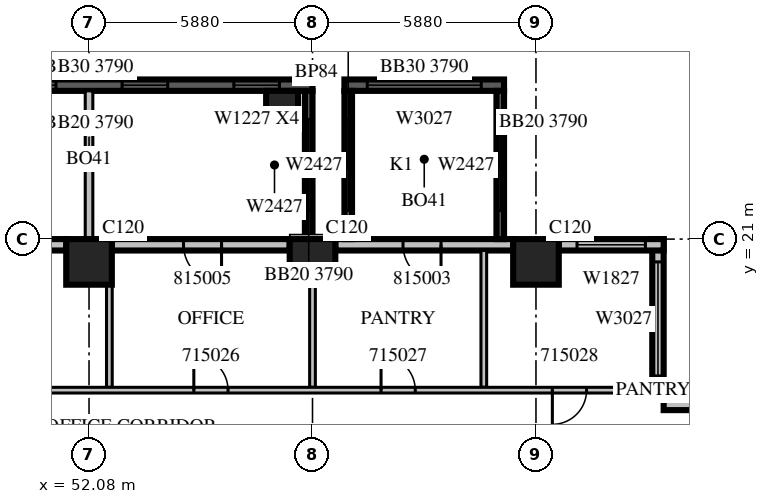
"""IFC4 building model, lengths in metres.
Left out: names, types, materials, properties, quantities, classifications, styles, units other than length and angle.
Written with IfcOpenShell. Run it as: python <this file> out.ifc"""

import sys

from ifc_helpers import new_model, si_unit, direction, frame, frame_2d, origin, origin_2d, place, context, subcontext, project, spatial, rectangle, extrude, source, transform, mapped, element, fill, save


model = new_model("IFC4")
c1 = context("Model", 3, precision=1e-05, world=origin(), true_north=direction((0.0, 1.0)))
c2 = subcontext(c1, "Body", "Model", "MODEL_VIEW")
j1 = project(units=[si_unit("LENGTHUNIT", "METRE"), si_unit("PLANEANGLEUNIT", "RADIAN")], contexts=[c1])
p1 = place(None, origin())
s1 = spatial("IfcSite", under=j1, at=p1, CompositionType="ELEMENT")
p2 = place(p1, origin())
s2 = spatial("IfcBuilding", under=s1, at=p2, CompositionType="ELEMENT")
p3 = place(p2, frame((0.0, 0.0, 74.1)))
s3 = spatial("IfcBuildingStorey", under=s2, at=p3, CompositionType="ELEMENT", Elevation=74.1)
m1 = source(origin(), c2, "Body", "SweptSolid", [
    extrude(rectangle(XDim=1.2, YDim=1.2, at=origin_2d()), origin(), (0.0, 0.0, 1.0), 4.2),
])
for number, where, z_axis, x_axis in (
    (1, (52.08, 20.4, 0.0), (0.0, 0.0, 1.0), (1.0, 0.0, 0.0)),
    (2, (57.96, 20.4, 0.0), (0.0, 0.0, 1.0), (1.0, 0.0, 0.0)),
    (3, (63.84, 20.4, 0.0), (0.0, 0.0, 1.0), (1.0, 0.0, 0.0)),
):
    element("IfcColumn", number, at=place(p3, frame(where, z_axis=z_axis, x_axis=x_axis)), inside=s3, PredefinedType="COLUMN", context=c2, shape_type="MappedRepresentation", body=[
        mapped(m1, transform((0.0, 0.0, 0.0), scale=1.0)),
    ])
m2 = source(origin(), c2, "Body", "SweptSolid", [
    extrude(rectangle(XDim=0.84, YDim=0.84, at=origin_2d()), origin(), (0.0, 0.0, 1.0), 4.2),
])
p4 = place(p3, frame((57.16, 24.48, 0.0), z_axis=(0.0, 0.0, 1.0), x_axis=(1.0, 0.0, 0.0)))
e4 = element("IfcColumn", 4, at=p4, inside=s3, PredefinedType="COLUMN", context=c2, shape_type="MappedRepresentation", body=[
    mapped(m2, transform((0.0, 0.0, 0.0), scale=1.0)),
])
m3 = source(origin(), c2, "Body", "SweptSolid", [
    extrude(rectangle(XDim=11.76, YDim=0.3, at=frame_2d((5.88, 0.0))), origin(), (0.0, 0.0, 1.0), 3.79),
])
p5 = place(p3, frame((57.96, 25.05, 0.0), z_axis=(0.0, 0.0, 1.0), x_axis=(-1.0, 0.0, 0.0)))
e5 = element("IfcWall", 5, at=p5, inside=s3, PredefinedType="SOLIDWALL", context=c2, shape_type="MappedRepresentation", body=[
    mapped(m3, transform((0.0, 0.0, 0.0), scale=1.0)),
])
m4 = source(origin(), c2, "Body", "SweptSolid", [
    extrude(rectangle(XDim=1.2, YDim=2.7, at=frame_2d((0.6, 1.35))), frame((0.0, 0.16, 0.0), z_axis=(0.0, -1.0, 0.0), x_axis=(1.0, 0.0, 0.0)), (0.0, 0.0, 1.0), 0.32),
])
p6 = place(p5, frame((0.87, 0.0, 0.6)))
e6 = element("IfcOpeningElement", 6, at=p6, cuts=e5, PredefinedType="OPENING", context=c2, shape_type="MappedRepresentation", body=[
    mapped(m4, transform((0.0, 0.0, 0.0), scale=1.0)),
])
p7 = place(p5, frame((3.81, 0.0, 0.6)))
e7 = element("IfcOpeningElement", 7, at=p7, cuts=e5, PredefinedType="OPENING", context=c2, shape_type="MappedRepresentation", body=[
    mapped(m4, transform((0.0, 0.0, 0.0), scale=1.0)),
])
p8 = place(p5, frame((6.75, 0.0, 0.6)))
e8 = element("IfcOpeningElement", 8, at=p8, cuts=e5, PredefinedType="OPENING", context=c2, shape_type="MappedRepresentation", body=[
    mapped(m4, transform((0.0, 0.0, 0.0), scale=1.0)),
])
p9 = place(p5, frame((9.69, 0.0, 0.6)))
e9 = element("IfcOpeningElement", 9, at=p9, cuts=e5, PredefinedType="OPENING", context=c2, shape_type="MappedRepresentation", body=[
    mapped(m4, transform((0.0, 0.0, 0.0), scale=1.0)),
])
m5 = source(origin(), c2, "Body", "SweptSolid", [
    extrude(rectangle(XDim=3.9, YDim=0.2, at=frame_2d((1.95, 0.0))), origin(), (0.0, 0.0, 1.0), 3.79),
])
p10 = place(p3, frame((52.08, 21.0, 0.0), z_axis=(0.0, 0.0, 1.0), x_axis=(0.0, 1.0, 0.0)))
e10 = element("IfcWall", 10, at=p10, inside=s3, PredefinedType="SOLIDWALL", context=c2, shape_type="MappedRepresentation", body=[
    mapped(m5, transform((0.0, 0.0, 0.0), scale=1.0)),
])
m6 = source(origin(), c2, "Body", "SweptSolid", [
    extrude(rectangle(XDim=3.9, YDim=0.2, at=frame_2d((1.95, 0.0))), origin(), (0.0, 0.0, 1.0), 3.79),
])
p11 = place(p3, frame((57.86, 21.0, 0.0), z_axis=(0.0, 0.0, 1.0), x_axis=(0.0, 1.0, 0.0)))
e11 = element("IfcWall", 11, at=p11, inside=s3, PredefinedType="SOLIDWALL", context=c2, shape_type="MappedRepresentation", body=[
    mapped(m6, transform((0.0, 0.0, 0.0), scale=1.0)),
])
m7 = source(origin(), c2, "Body", "SweptSolid", [
    extrude(rectangle(XDim=2.4, YDim=2.7, at=frame_2d((1.2, 1.35))), frame((0.0, 0.11, 0.0), z_axis=(0.0, -1.0, 0.0), x_axis=(1.0, 0.0, 0.0)), (0.0, 0.0, 1.0), 0.22),
])
p12 = place(p11, frame((0.75, 0.0, 0.6)))
e12 = element("IfcOpeningElement", 12, at=p12, cuts=e11, PredefinedType="OPENING", context=c2, shape_type="MappedRepresentation", body=[
    mapped(m7, transform((0.0, 0.0, 0.0), scale=1.0)),
])
m8 = source(origin(), c2, "Body", "SweptSolid", [
    extrude(rectangle(XDim=4.2, YDim=0.3, at=frame_2d((2.1, 0.0))), origin(), (0.0, 0.0, 1.0), 3.8),
])
p13 = place(p3, frame((71.4, 16.65, 0.0), z_axis=(0.0, 0.0, 1.0), x_axis=(-1.0, 0.0, 0.0)))
e13 = element("IfcWall", 13, at=p13, inside=s3, PredefinedType="STANDARD", context=c2, shape_type="MappedRepresentation", body=[
    mapped(m8, transform((0.0, 0.0, 0.0), scale=1.0)),
])
p14 = place(p13, frame((0.66, 0.0, 0.6)))
e14 = element("IfcOpeningElement", 14, at=p14, cuts=e13, PredefinedType="OPENING", context=c2, shape_type="MappedRepresentation", body=[
    mapped(m4, transform((0.0, 0.0, 0.0), scale=1.0)),
])
p15 = place(p3, frame((67.05, 16.8, 0.0), z_axis=(0.0, 0.0, 1.0), x_axis=(0.0, 1.0, 0.0)))
e15 = element("IfcWall", 15, at=p15, inside=s3, PredefinedType="STANDARD", context=c2, shape_type="MappedRepresentation", body=[
    mapped(m8, transform((0.0, 0.0, 0.0), scale=1.0)),
])
m9 = source(origin(), c2, "Body", "SweptSolid", [
    extrude(rectangle(XDim=3.0, YDim=2.7, at=frame_2d((1.5, 1.35))), frame((0.0, 0.16, 0.0), z_axis=(0.0, -1.0, 0.0), x_axis=(1.0, 0.0, 0.0)), (0.0, 0.0, 1.0), 0.32),
])
p16 = place(p15, frame((0.6, 0.0, 0.6)))
e16 = element("IfcOpeningElement", 16, at=p16, cuts=e15, PredefinedType="OPENING", context=c2, shape_type="MappedRepresentation", body=[
    mapped(m9, transform((0.0, 0.0, 0.0), scale=1.0)),
])
m10 = source(origin(), c2, "Body", "SweptSolid", [
    extrude(rectangle(XDim=2.76, YDim=0.3, at=frame_2d((1.38, 0.0))), origin(), (0.0, 0.0, 1.0), 3.8),
])
p17 = place(p3, frame((67.2, 20.85, 0.0), z_axis=(0.0, 0.0, 1.0), x_axis=(-1.0, 0.0, 0.0)))
e17 = element("IfcWall", 17, at=p17, inside=s3, PredefinedType="STANDARD", context=c2, shape_type="MappedRepresentation", body=[
    mapped(m10, transform((0.0, 0.0, 0.0), scale=1.0)),
])
m11 = source(origin(), c2, "Body", "SweptSolid", [
    extrude(rectangle(XDim=1.8, YDim=2.7, at=frame_2d((0.9, 1.35))), frame((0.0, 0.16, 0.0), z_axis=(0.0, -1.0, 0.0), x_axis=(1.0, 0.0, 0.0)), (0.0, 0.0, 1.0), 0.32),
])
p18 = place(p17, frame((0.48, 0.0, 0.6)))
e18 = element("IfcOpeningElement", 18, at=p18, cuts=e17, PredefinedType="OPENING", context=c2, shape_type="MappedRepresentation", body=[
    mapped(m11, transform((0.0, 0.0, 0.0), scale=1.0)),
])
m12 = source(origin(), c2, "Body", "SweptSolid", [
    extrude(rectangle(XDim=4.68, YDim=0.3, at=frame_2d((2.34, 0.0))), origin(), (0.0, 0.0, 1.0), 3.8),
])
p19 = place(p3, frame((63.24, 20.85, 0.0), z_axis=(0.0, 0.0, 1.0), x_axis=(-1.0, 0.0, 0.0)))
e19 = element("IfcWall", 19, at=p19, inside=s3, PredefinedType="STANDARD", context=c2, shape_type="MappedRepresentation", body=[
    mapped(m12, transform((0.0, 0.0, 0.0), scale=1.0)),
])
m13 = source(origin(), c2, "Body", "SweptSolid", [
    extrude(rectangle(XDim=1.0, YDim=2.1, at=frame_2d((0.5, 1.05))), frame((0.0, 0.16, 0.0), z_axis=(0.0, -1.0, 0.0), x_axis=(1.0, 0.0, 0.0)), (0.0, 0.0, 1.0), 0.32),
])
p20 = place(p19, frame((1.898, 0.0, 0.0)))
e20 = element("IfcOpeningElement", 20, at=p20, cuts=e19, PredefinedType="OPENING", context=c2, shape_type="MappedRepresentation", body=[
    mapped(m13, transform((0.0, 0.0, 0.0), scale=1.0)),
])
p21 = place(p3, frame((57.36, 20.85, 0.0), z_axis=(0.0, 0.0, 1.0), x_axis=(-1.0, 0.0, 0.0)))
e21 = element("IfcWall", 21, at=p21, inside=s3, PredefinedType="STANDARD", context=c2, shape_type="MappedRepresentation", body=[
    mapped(m12, transform((0.0, 0.0, 0.0), scale=1.0)),
])
p22 = place(p21, frame((1.793, 0.0, 0.0)))
e22 = element("IfcOpeningElement", 22, at=p22, cuts=e21, PredefinedType="OPENING", context=c2, shape_type="MappedRepresentation", body=[
    mapped(m13, transform((0.0, 0.0, 0.0), scale=1.0)),
])
p23 = place(p3, frame((51.48, 20.85, 0.0), z_axis=(0.0, 0.0, 1.0), x_axis=(-1.0, 0.0, 0.0)))
e23 = element("IfcWall", 23, at=p23, inside=s3, PredefinedType="STANDARD", context=c2, shape_type="MappedRepresentation", body=[
    mapped(m12, transform((0.0, 0.0, 0.0), scale=1.0)),
])
p24 = place(p23, frame((1.887, 0.0, 0.0)))
e24 = element("IfcOpeningElement", 24, at=p24, cuts=e23, PredefinedType="OPENING", context=c2, shape_type="MappedRepresentation", body=[
    mapped(m13, transform((0.0, 0.0, 0.0), scale=1.0)),
])
m14 = source(origin(), c2, "Body", "SweptSolid", [
    extrude(rectangle(XDim=4.2, YDim=0.3, at=frame_2d((2.1, 0.0))), origin(), (0.0, 0.0, 1.0), 3.79),
])
p25 = place(p3, frame((63.0, 25.05, 0.0), z_axis=(0.0, 0.0, 1.0), x_axis=(-1.0, 0.0, 0.0)))
e25 = element("IfcWall", 25, at=p25, inside=s3, PredefinedType="SOLIDWALL", context=c2, shape_type="MappedRepresentation", body=[
    mapped(m14, transform((0.0, 0.0, 0.0), scale=1.0)),
])
p26 = place(p25, frame((0.6, 0.0, 0.6)))
e26 = element("IfcOpeningElement", 26, at=p26, cuts=e25, PredefinedType="OPENING", context=c2, shape_type="MappedRepresentation", body=[
    mapped(m9, transform((0.0, 0.0, 0.0), scale=1.0)),
])
p27 = place(p3, frame((62.9, 21.0, 0.0), z_axis=(0.0, 0.0, 1.0), x_axis=(0.0, 1.0, 0.0)))
e27 = element("IfcWall", 27, at=p27, inside=s3, PredefinedType="SOLIDWALL", context=c2, shape_type="MappedRepresentation", body=[
    mapped(m6, transform((0.0, 0.0, 0.0), scale=1.0)),
])
p28 = place(p27, frame((0.75, 0.0, 0.6)))
e28 = element("IfcOpeningElement", 28, at=p28, cuts=e27, PredefinedType="OPENING", context=c2, shape_type="MappedRepresentation", body=[
    mapped(m7, transform((0.0, 0.0, 0.0), scale=1.0)),
])
p29 = place(p3, frame((58.9, 21.0, 0.0), z_axis=(0.0, 0.0, 1.0), x_axis=(0.0, 1.0, 0.0)))
e29 = element("IfcWall", 29, at=p29, inside=s3, PredefinedType="SOLIDWALL", context=c2, shape_type="MappedRepresentation", body=[
    mapped(m6, transform((0.0, 0.0, 0.0), scale=1.0)),
])
p30 = place(p29, frame((0.75, 0.0, 0.6)))
e30 = element("IfcOpeningElement", 30, at=p30, cuts=e29, PredefinedType="OPENING", context=c2, shape_type="MappedRepresentation", body=[
    mapped(m7, transform((0.0, 0.0, 0.0), scale=1.0)),
])
m15 = source(origin(), c2, "Body", "SweptSolid", [
    extrude(rectangle(XDim=2.701, YDim=0.15, at=frame_2d((1.351, 0.0))), origin(), (0.0, 0.0, 1.0), 3.8),
])
p31 = place(p3, frame((52.615, 19.801, 0.0), z_axis=(0.0, 0.0, 1.0), x_axis=(0.0, -1.0, 0.0)))
e31 = element("IfcWall", 31, at=p31, inside=s3, PredefinedType="PARTITIONING", context=c2, shape_type="MappedRepresentation", body=[
    mapped(m15, transform((0.0, 0.0, 0.0), scale=1.0)),
])
m16 = source(origin(), c2, "Body", "SweptSolid", [
    extrude(rectangle(XDim=3.6, YDim=0.15, at=frame_2d((1.8, 0.0))), origin(), (0.0, 0.0, 1.0), 3.8),
])
p32 = place(p3, frame((62.468, 20.7, 0.0), z_axis=(0.0, 0.0, 1.0), x_axis=(0.0, -1.0, 0.0)))
e32 = element("IfcWall", 32, at=p32, inside=s3, PredefinedType="PARTITIONING", context=c2, shape_type="MappedRepresentation", body=[
    mapped(m16, transform((0.0, 0.0, 0.0), scale=1.0)),
])
p33 = place(p3, frame((57.96, 17.1, 0.0), z_axis=(0.0, 0.0, 1.0), x_axis=(0.0, 1.0, 0.0)))
e33 = element("IfcWall", 33, at=p33, inside=s3, PredefinedType="PARTITIONING", context=c2, shape_type="MappedRepresentation", body=[
    mapped(m15, transform((0.0, 0.0, 0.0), scale=1.0)),
])
m17 = source(origin(), c2, "Body", "SweptSolid", [
    extrude(rectangle(XDim=37.5, YDim=0.15, at=frame_2d((18.75, 0.0))), origin(), (0.0, 0.0, 1.0), 3.3),
])
p34 = place(p3, frame((29.4, 17.025, 0.0), z_axis=(0.0, 0.0, 1.0), x_axis=(1.0, 0.0, 0.0)))
e34 = element("IfcWall", 34, at=p34, inside=s3, PredefinedType="PARTITIONING", context=c2, shape_type="MappedRepresentation", body=[
    mapped(m17, transform((0.0, 0.0, 0.0), scale=1.0)),
])
m18 = source(origin(), c2, "Body", "SweptSolid", [
    extrude(rectangle(XDim=1.0, YDim=2.1, at=frame_2d((0.5, 1.05))), frame((0.0, 0.085, 0.0), z_axis=(0.0, -1.0, 0.0), x_axis=(1.0, 0.0, 0.0)), (0.0, 0.0, 1.0), 0.17),
])
p35 = place(p34, frame((1.357, 0.0, 0.0)))
e35 = element("IfcOpeningElement", 35, at=p35, cuts=e34, PredefinedType="OPENING", context=c2, shape_type="MappedRepresentation", body=[
    mapped(m18, transform((0.0, 0.0, 0.0), scale=1.0)),
])
p36 = place(p34, frame((4.669, 0.0, 0.0)))
e36 = element("IfcOpeningElement", 36, at=p36, cuts=e34, PredefinedType="OPENING", context=c2, shape_type="MappedRepresentation", body=[
    mapped(m18, transform((0.0, 0.0, 0.0), scale=1.0)),
])
p37 = place(p34, frame((7.012, 0.0, 0.0)))
e37 = element("IfcOpeningElement", 37, at=p37, cuts=e34, PredefinedType="OPENING", context=c2, shape_type="MappedRepresentation", body=[
    mapped(m18, transform((0.0, 0.0, 0.0), scale=1.0)),
])
p38 = place(p34, frame((10.0, 0.0, 0.0)))
e38 = element("IfcOpeningElement", 38, at=p38, cuts=e34, PredefinedType="OPENING", context=c2, shape_type="MappedRepresentation", body=[
    mapped(m18, transform((0.0, 0.0, 0.0), scale=1.0)),
])
m19 = source(origin(), c2, "Body", "SweptSolid", [
    extrude(rectangle(XDim=0.9, YDim=2.1, at=frame_2d((0.45, 1.05))), frame((0.0, 0.085, 0.0), z_axis=(0.0, -1.0, 0.0), x_axis=(1.0, 0.0, 0.0)), (0.0, 0.0, 1.0), 0.17),
])
p39 = place(p34, frame((14.822, 0.0, 0.0)))
e39 = element("IfcOpeningElement", 39, at=p39, cuts=e34, PredefinedType="OPENING", context=c2, shape_type="MappedRepresentation", body=[
    mapped(m19, transform((0.0, 0.0, 0.0), scale=1.0)),
])
p40 = place(p34, frame((20.13, 0.0, 0.0)))
e40 = element("IfcOpeningElement", 40, at=p40, cuts=e34, PredefinedType="OPENING", context=c2, shape_type="MappedRepresentation", body=[
    mapped(m19, transform((0.0, 0.0, 0.0), scale=1.0)),
])
p41 = place(p34, frame((25.438, 0.0, 0.0)))
e41 = element("IfcOpeningElement", 41, at=p41, cuts=e34, PredefinedType="OPENING", context=c2, shape_type="MappedRepresentation", body=[
    mapped(m19, transform((0.0, 0.0, 0.0), scale=1.0)),
])
p42 = place(p34, frame((30.364, 0.0, 0.0)))
e42 = element("IfcOpeningElement", 42, at=p42, cuts=e34, PredefinedType="OPENING", context=c2, shape_type="MappedRepresentation", body=[
    mapped(m19, transform((0.0, 0.0, 0.0), scale=1.0)),
])
p43 = place(p34, frame((34.871, 0.0, 0.0)))
e43 = element("IfcOpeningElement", 43, at=p43, cuts=e34, PredefinedType="OPENING", context=c2, shape_type="MappedRepresentation", body=[
    mapped(m19, transform((0.0, 0.0, 0.0), scale=1.0)),
])
m20 = source(origin(), c2, "Body", "SweptSolid", [
    extrude(rectangle(XDim=1.2, YDim=2.7, at=frame_2d((0.6, 1.35))), frame((0.0, 0.03, 0.0), z_axis=(0.0, -1.0, 0.0), x_axis=(1.0, 0.0, 0.0)), (0.0, 0.0, 1.0), 0.06),
])
p44 = place(p6, origin())
e44 = element("IfcWindow", 44, at=p44, inside=s3, PartitioningType="SINGLE_PANEL", PredefinedType="WINDOW", context=c2, shape_type="MappedRepresentation", body=[
    mapped(m20, transform((0.0, 0.0, 0.0), scale=1.0)),
])
fill(e6, e44)
p45 = place(p7, origin())
e45 = element("IfcWindow", 45, at=p45, inside=s3, PartitioningType="SINGLE_PANEL", PredefinedType="WINDOW", context=c2, shape_type="MappedRepresentation", body=[
    mapped(m20, transform((0.0, 0.0, 0.0), scale=1.0)),
])
fill(e7, e45)
p46 = place(p8, origin())
e46 = element("IfcWindow", 46, at=p46, inside=s3, PartitioningType="SINGLE_PANEL", PredefinedType="WINDOW", context=c2, shape_type="MappedRepresentation", body=[
    mapped(m20, transform((0.0, 0.0, 0.0), scale=1.0)),
])
fill(e8, e46)
m21 = source(origin(), c2, "Body", "SweptSolid", [
    extrude(rectangle(XDim=2.4, YDim=2.7, at=frame_2d((1.2, 1.35))), frame((0.0, 0.03, 0.0), z_axis=(0.0, -1.0, 0.0), x_axis=(1.0, 0.0, 0.0)), (0.0, 0.0, 1.0), 0.06),
])
p47 = place(p12, origin())
e47 = element("IfcWindow", 47, at=p47, inside=s3, PartitioningType="SINGLE_PANEL", PredefinedType="WINDOW", context=c2, shape_type="MappedRepresentation", body=[
    mapped(m21, transform((0.0, 0.0, 0.0), scale=1.0)),
])
fill(e12, e47)
m22 = source(origin(), c2, "Body", "SweptSolid", [
    extrude(rectangle(XDim=3.0, YDim=2.7, at=frame_2d((1.5, 1.35))), frame((0.0, 0.03, 0.0), z_axis=(0.0, -1.0, 0.0), x_axis=(1.0, 0.0, 0.0)), (0.0, 0.0, 1.0), 0.06),
])
p48 = place(p16, origin())
e48 = element("IfcWindow", 48, at=p48, inside=s3, PartitioningType="SINGLE_PANEL", PredefinedType="WINDOW", context=c2, shape_type="MappedRepresentation", body=[
    mapped(m22, transform((0.0, 0.0, 0.0), scale=1.0)),
])
fill(e16, e48)
m23 = source(origin(), c2, "Body", "SweptSolid", [
    extrude(rectangle(XDim=1.8, YDim=2.7, at=frame_2d((0.9, 1.35))), frame((0.0, 0.03, 0.0), z_axis=(0.0, -1.0, 0.0), x_axis=(1.0, 0.0, 0.0)), (0.0, 0.0, 1.0), 0.06),
])
p49 = place(p18, origin())
e49 = element("IfcWindow", 49, at=p49, inside=s3, PartitioningType="SINGLE_PANEL", PredefinedType="WINDOW", context=c2, shape_type="MappedRepresentation", body=[
    mapped(m23, transform((0.0, 0.0, 0.0), scale=1.0)),
])
fill(e18, e49)
p50 = place(p26, origin())
e50 = element("IfcWindow", 50, at=p50, inside=s3, PartitioningType="SINGLE_PANEL", PredefinedType="WINDOW", context=c2, shape_type="MappedRepresentation", body=[
    mapped(m22, transform((0.0, 0.0, 0.0), scale=1.0)),
])
fill(e26, e50)
p51 = place(p28, origin())
e51 = element("IfcWindow", 51, at=p51, inside=s3, PartitioningType="SINGLE_PANEL", PredefinedType="WINDOW", context=c2, shape_type="MappedRepresentation", body=[
    mapped(m21, transform((0.0, 0.0, 0.0), scale=1.0)),
])
fill(e28, e51)
p52 = place(p30, origin())
e52 = element("IfcWindow", 52, at=p52, inside=s3, PartitioningType="SINGLE_PANEL", PredefinedType="WINDOW", context=c2, shape_type="MappedRepresentation", body=[
    mapped(m21, transform((0.0, 0.0, 0.0), scale=1.0)),
])
fill(e30, e52)
m24 = source(origin(), c2, "Body", "SweptSolid", [
    extrude(rectangle(XDim=0.9, YDim=2.1, at=frame_2d((0.45, 1.05))), frame((0.0, 0.025, 0.0), z_axis=(0.0, -1.0, 0.0), x_axis=(1.0, 0.0, 0.0)), (0.0, 0.0, 1.0), 0.05),
])
p53 = place(p41, origin())
e53 = element("IfcDoor", 53, at=p53, inside=s3, OperationType="SINGLE_SWING_LEFT", PredefinedType="DOOR", context=c2, shape_type="MappedRepresentation", body=[
    mapped(m24, transform((0.0, 0.0, 0.0), scale=1.0)),
])
fill(e41, e53)
p54 = place(p42, origin())
e54 = element("IfcDoor", 54, at=p54, inside=s3, OperationType="SINGLE_SWING_LEFT", PredefinedType="DOOR", context=c2, shape_type="MappedRepresentation", body=[
    mapped(m24, transform((0.0, 0.0, 0.0), scale=1.0)),
])
fill(e42, e54)
p55 = place(p43, origin())
e55 = element("IfcDoor", 55, at=p55, inside=s3, OperationType="SINGLE_SWING_RIGHT", PredefinedType="DOOR", context=c2, shape_type="MappedRepresentation", body=[
    mapped(m24, transform((0.0, 0.0, 0.0), scale=1.0)),
])
fill(e43, e55)
m25 = source(origin(), c2, "Body", "SweptSolid", [
    extrude(rectangle(XDim=1.0, YDim=2.1, at=frame_2d((0.5, 1.05))), frame((0.0, 0.025, 0.0), z_axis=(0.0, -1.0, 0.0), x_axis=(1.0, 0.0, 0.0)), (0.0, 0.0, 1.0), 0.05),
])
p56 = place(p20, origin())
e56 = element("IfcDoor", 56, at=p56, inside=s3, OperationType="SINGLE_SWING_LEFT", PredefinedType="DOOR", context=c2, shape_type="MappedRepresentation", body=[
    mapped(m25, transform((0.0, 0.0, 0.0), scale=1.0)),
])
fill(e20, e56)
p57 = place(p22, origin())
e57 = element("IfcDoor", 57, at=p57, inside=s3, OperationType="SINGLE_SWING_LEFT", PredefinedType="DOOR", context=c2, shape_type="MappedRepresentation", body=[
    mapped(m25, transform((0.0, 0.0, 0.0), scale=1.0)),
])
fill(e22, e57)
save(model, sys.argv[1])
